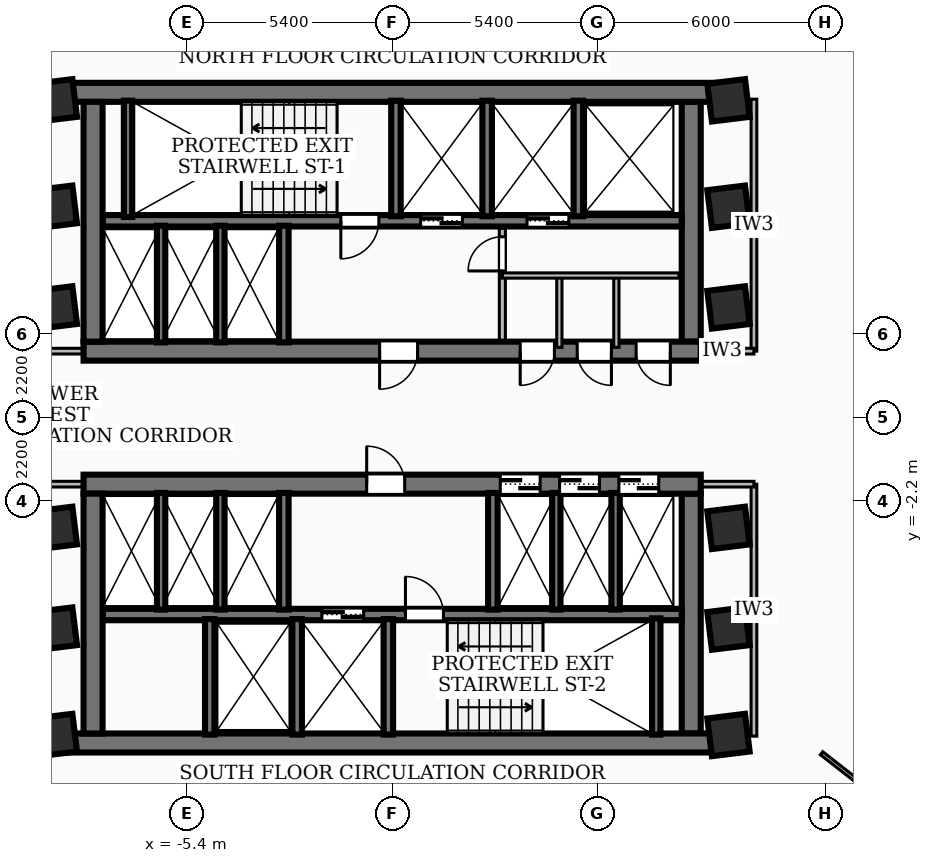
"""IFC4 building model, lengths in metres.
Left out: names, types, materials, properties, quantities, classifications, styles, units other than length and angle.
Written with IfcOpenShell. Run it as: python <this file> out.ifc"""

import sys

from ifc_helpers import new_model, si_unit, direction, frame, frame_2d, origin, origin_2d, place, context, subcontext, project, spatial, rectangle, extrude, element, fill, save


model = new_model("IFC4")
c1 = context("Model", 3, precision=1e-05, world=origin(), true_north=direction((0.0, 1.0)))
c2 = subcontext(c1, "Body", "Model", "MODEL_VIEW")
j1 = project(units=[si_unit("LENGTHUNIT", "METRE"), si_unit("PLANEANGLEUNIT", "RADIAN")], contexts=[c1])
p1 = place(None, origin())
s1 = spatial("IfcSite", under=j1, at=p1, CompositionType="ELEMENT")
p2 = place(p1, origin())
s2 = spatial("IfcBuilding", under=s1, at=p2, CompositionType="ELEMENT")
p3 = place(p2, frame((0.0, 0.0, 82.08)))
s3 = spatial("IfcBuildingStorey", under=s2, at=p3, CompositionType="ELEMENT", Elevation=82.08)
p4 = place(p3, frame((-8.78, 8.56, 0.0), z_axis=(0.0, 0.0, 1.0), x_axis=(1.0, 0.0, 0.0)))
e1 = element("IfcWall", 1, at=p4, inside=s3, PredefinedType="SHEAR", context=c2, shape_type="SweptSolid", body=[
    extrude(rectangle(XDim=17.56, YDim=0.5, at=frame_2d((8.78, 0.0))), origin(), (0.0, 0.0, 1.0), 3.34),
])
p5 = place(p3, frame((8.12, 1.75, 0.0), z_axis=(0.0, 0.0, 1.0), x_axis=(-1.0, 0.0, 0.0)))
e2 = element("IfcWall", 2, at=p5, inside=s3, PredefinedType="SHEAR", context=c2, shape_type="SweptSolid", body=[
    extrude(rectangle(XDim=16.24, YDim=0.5, at=frame_2d((8.12, 0.0))), origin(), (0.0, 0.0, 1.0), 3.34),
])
p6 = place(p5, frame((7.45, 0.0, 0.0)))
e3 = element("IfcOpeningElement", 3, at=p6, cuts=e2, PredefinedType="OPENING", context=c2, shape_type="SweptSolid", body=[
    extrude(rectangle(XDim=1.0, YDim=2.1, at=frame_2d((0.5, 1.05))), frame((0.0, 0.26, 0.0), z_axis=(0.0, -1.0, 0.0), x_axis=(1.0, 0.0, 0.0)), (0.0, 0.0, 1.0), 0.52),
])
p7 = place(p5, frame((3.85, 0.0, 0.0)))
e4 = element("IfcOpeningElement", 4, at=p7, cuts=e2, PredefinedType="OPENING", context=c2, shape_type="SweptSolid", body=[
    extrude(rectangle(XDim=0.9, YDim=2.06, at=frame_2d((0.45, 1.03))), frame((0.0, 0.26, 0.0), z_axis=(0.0, -1.0, 0.0), x_axis=(1.0, 0.0, 0.0)), (0.0, 0.0, 1.0), 0.52),
])
p8 = place(p5, frame((2.35, 0.0, 0.0)))
e5 = element("IfcOpeningElement", 5, at=p8, cuts=e2, PredefinedType="OPENING", context=c2, shape_type="SweptSolid", body=[
    extrude(rectangle(XDim=0.9, YDim=2.06, at=frame_2d((0.45, 1.03))), frame((0.0, 0.26, 0.0), z_axis=(0.0, -1.0, 0.0), x_axis=(1.0, 0.0, 0.0)), (0.0, 0.0, 1.0), 0.52),
])
p9 = place(p5, frame((0.8, 0.0, 0.0)))
e6 = element("IfcOpeningElement", 6, at=p9, cuts=e2, PredefinedType="OPENING", context=c2, shape_type="SweptSolid", body=[
    extrude(rectangle(XDim=0.9, YDim=2.06, at=frame_2d((0.45, 1.03))), frame((0.0, 0.26, 0.0), z_axis=(0.0, -1.0, 0.0), x_axis=(1.0, 0.0, 0.0)), (0.0, 0.0, 1.0), 0.52),
])
for number, where, z_axis, x_axis in (
    (7, (-7.87, 2.0, 0.0), (0.0, 0.0, 1.0), (0.0, 1.0, 0.0)),
    (8, (7.87, 8.31, 0.0), (0.0, 0.0, 1.0), (0.0, -1.0, 0.0)),
):
    element("IfcWall", number, at=place(p3, frame(where, z_axis=z_axis, x_axis=x_axis)), inside=s3, PredefinedType="SHEAR", context=c2, shape_type="SweptSolid", body=[
        extrude(rectangle(XDim=6.31, YDim=0.5, at=frame_2d((3.155, 0.0))), origin(), (0.0, 0.0, 1.0), 3.34),
    ])
p10 = place(p3, frame((7.62, 5.18, 0.0), z_axis=(0.0, 0.0, 1.0), x_axis=(-1.0, 0.0, 0.0)))
e9 = element("IfcWall", 9, at=p10, inside=s3, PredefinedType="SOLIDWALL", context=c2, shape_type="SweptSolid", body=[
    extrude(rectangle(XDim=15.24, YDim=0.3, at=frame_2d((7.62, 0.0))), origin(), (0.0, 0.0, 1.0), 3.34),
])
p11 = place(p10, frame((5.77, 0.0, 0.0)))
e10 = element("IfcOpeningElement", 10, at=p11, cuts=e9, PredefinedType="OPENING", context=c2, shape_type="SweptSolid", body=[
    extrude(rectangle(XDim=1.1, YDim=2.15, at=frame_2d((0.55, 1.075))), frame((0.0, 0.16, 0.0), z_axis=(0.0, -1.0, 0.0), x_axis=(1.0, 0.0, 0.0)), (0.0, 0.0, 1.0), 0.32),
])
p12 = place(p10, frame((2.97, 0.0, 0.0)))
e11 = element("IfcOpeningElement", 11, at=p12, cuts=e9, PredefinedType="OPENING", context=c2, shape_type="SweptSolid", body=[
    extrude(rectangle(XDim=1.1, YDim=2.15, at=frame_2d((0.55, 1.075))), frame((0.0, 0.16, 0.0), z_axis=(0.0, -1.0, 0.0), x_axis=(1.0, 0.0, 0.0)), (0.0, 0.0, 1.0), 0.32),
])
p13 = place(p10, frame((7.97, 0.0, 0.0)))
e12 = element("IfcOpeningElement", 12, at=p13, cuts=e9, PredefinedType="OPENING", context=c2, shape_type="SweptSolid", body=[
    extrude(rectangle(XDim=1.0, YDim=2.1, at=frame_2d((0.5, 1.05))), frame((0.0, 0.16, 0.0), z_axis=(0.0, -1.0, 0.0), x_axis=(1.0, 0.0, 0.0)), (0.0, 0.0, 1.0), 0.32),
])
p14 = place(p3, frame((8.78, -8.56, 0.0), z_axis=(0.0, 0.0, 1.0), x_axis=(-1.0, 0.0, 0.0)))
e13 = element("IfcWall", 13, at=p14, inside=s3, PredefinedType="SHEAR", context=c2, shape_type="SweptSolid", body=[
    extrude(rectangle(XDim=17.56, YDim=0.5, at=frame_2d((8.78, 0.0))), origin(), (0.0, 0.0, 1.0), 3.34),
])
p15 = place(p3, frame((-8.12, -1.75, 0.0), z_axis=(0.0, 0.0, 1.0), x_axis=(1.0, 0.0, 0.0)))
e14 = element("IfcWall", 14, at=p15, inside=s3, PredefinedType="SHEAR", context=c2, shape_type="SweptSolid", body=[
    extrude(rectangle(XDim=16.24, YDim=0.5, at=frame_2d((8.12, 0.0))), origin(), (0.0, 0.0, 1.0), 3.34),
])
p16 = place(p15, frame((7.45, 0.0, 0.0)))
e15 = element("IfcOpeningElement", 15, at=p16, cuts=e14, PredefinedType="OPENING", context=c2, shape_type="SweptSolid", body=[
    extrude(rectangle(XDim=1.0, YDim=2.1, at=frame_2d((0.5, 1.05))), frame((0.0, 0.26, 0.0), z_axis=(0.0, -1.0, 0.0), x_axis=(1.0, 0.0, 0.0)), (0.0, 0.0, 1.0), 0.52),
])
p17 = place(p15, frame((10.965, 0.0, 0.0)))
e16 = element("IfcOpeningElement", 16, at=p17, cuts=e14, PredefinedType="OPENING", context=c2, shape_type="SweptSolid", body=[
    extrude(rectangle(XDim=1.05, YDim=2.15, at=frame_2d((0.525, 1.075))), frame((0.0, 0.26, 0.0), z_axis=(0.0, -1.0, 0.0), x_axis=(1.0, 0.0, 0.0)), (0.0, 0.0, 1.0), 0.52),
])
p18 = place(p15, frame((12.525, 0.0, 0.0)))
e17 = element("IfcOpeningElement", 17, at=p18, cuts=e14, PredefinedType="OPENING", context=c2, shape_type="SweptSolid", body=[
    extrude(rectangle(XDim=1.05, YDim=2.15, at=frame_2d((0.525, 1.075))), frame((0.0, 0.26, 0.0), z_axis=(0.0, -1.0, 0.0), x_axis=(1.0, 0.0, 0.0)), (0.0, 0.0, 1.0), 0.52),
])
p19 = place(p15, frame((14.085, 0.0, 0.0)))
e18 = element("IfcOpeningElement", 18, at=p19, cuts=e14, PredefinedType="OPENING", context=c2, shape_type="SweptSolid", body=[
    extrude(rectangle(XDim=1.05, YDim=2.15, at=frame_2d((0.525, 1.075))), frame((0.0, 0.26, 0.0), z_axis=(0.0, -1.0, 0.0), x_axis=(1.0, 0.0, 0.0)), (0.0, 0.0, 1.0), 0.52),
])
for number, where, z_axis, x_axis in (
    (19, (-7.87, -8.31, 0.0), (0.0, 0.0, 1.0), (0.0, 1.0, 0.0)),
    (20, (7.87, -2.0, 0.0), (0.0, 0.0, 1.0), (0.0, -1.0, 0.0)),
):
    element("IfcWall", number, at=place(p3, frame(where, z_axis=z_axis, x_axis=x_axis)), inside=s3, PredefinedType="SHEAR", context=c2, shape_type="SweptSolid", body=[
        extrude(rectangle(XDim=6.31, YDim=0.5, at=frame_2d((3.155, 0.0))), origin(), (0.0, 0.0, 1.0), 3.34),
    ])
p20 = place(p3, frame((-7.62, -5.18, 0.0), z_axis=(0.0, 0.0, 1.0), x_axis=(1.0, 0.0, 0.0)))
e21 = element("IfcWall", 21, at=p20, inside=s3, PredefinedType="SOLIDWALL", context=c2, shape_type="SweptSolid", body=[
    extrude(rectangle(XDim=15.24, YDim=0.3, at=frame_2d((7.62, 0.0))), origin(), (0.0, 0.0, 1.0), 3.34),
])
p21 = place(p20, frame((5.77, 0.0, 0.0)))
e22 = element("IfcOpeningElement", 22, at=p21, cuts=e21, PredefinedType="OPENING", context=c2, shape_type="SweptSolid", body=[
    extrude(rectangle(XDim=1.1, YDim=2.15, at=frame_2d((0.55, 1.075))), frame((0.0, 0.16, 0.0), z_axis=(0.0, -1.0, 0.0), x_axis=(1.0, 0.0, 0.0)), (0.0, 0.0, 1.0), 0.32),
])
p22 = place(p20, frame((7.97, 0.0, 0.0)))
e23 = element("IfcOpeningElement", 23, at=p22, cuts=e21, PredefinedType="OPENING", context=c2, shape_type="SweptSolid", body=[
    extrude(rectangle(XDim=1.0, YDim=2.1, at=frame_2d((0.5, 1.05))), frame((0.0, 0.16, 0.0), z_axis=(0.0, -1.0, 0.0), x_axis=(1.0, 0.0, 0.0)), (0.0, 0.0, 1.0), 0.32),
])
for number, where, z_axis, x_axis in (
    (24, (-6.95, 5.28, 0.0), (0.0, 0.0, 1.0), (0.0, 1.0, 0.0)),
    (25, (6.95, -8.34, 0.0), (0.0, 0.0, 1.0), (0.0, 1.0, 0.0)),
):
    element("IfcWall", number, at=place(p3, frame(where, z_axis=z_axis, x_axis=x_axis)), inside=s3, PredefinedType="SOLIDWALL", context=c2, shape_type="SweptSolid", body=[
        extrude(rectangle(XDim=3.06, YDim=0.22, at=frame_2d((1.53, 0.0))), origin(), (0.0, 0.0, 1.0), 3.34),
    ])
for number, where, z_axis, x_axis in (
    (26, (0.1, 5.3, 0.0), (0.0, 0.0, 1.0), (0.0, 1.0, 0.0)),
    (27, (2.5, 5.3, 0.0), (0.0, 0.0, 1.0), (0.0, 1.0, 0.0)),
    (28, (4.9, 5.3, 0.0), (0.0, 0.0, 1.0), (0.0, 1.0, 0.0)),
):
    element("IfcWall", number, at=place(p3, frame(where, z_axis=z_axis, x_axis=x_axis)), inside=s3, PredefinedType="SOLIDWALL", context=c2, shape_type="SweptSolid", body=[
        extrude(rectangle(XDim=3.04, YDim=0.25, at=frame_2d((1.52, 0.0))), origin(), (0.0, 0.0, 1.0), 3.34),
    ])
p23 = place(p3, frame((-2.85, 1.98, 0.0), z_axis=(0.0, 0.0, 1.0), x_axis=(0.0, 1.0, 0.0)))
e29 = element("IfcWall", 29, at=p23, inside=s3, PredefinedType="SOLIDWALL", context=c2, shape_type="SweptSolid", body=[
    extrude(rectangle(XDim=3.07, YDim=0.25, at=frame_2d((1.535, 0.0))), origin(), (0.0, 0.0, 1.0), 3.34),
])
for number, where, z_axis, x_axis in (
    (30, (-0.1, -8.34, 0.0), (0.0, 0.0, 1.0), (0.0, 1.0, 0.0)),
    (31, (-2.5, -8.34, 0.0), (0.0, 0.0, 1.0), (0.0, 1.0, 0.0)),
    (32, (-4.8, -8.34, 0.0), (0.0, 0.0, 1.0), (0.0, 1.0, 0.0)),
):
    element("IfcWall", number, at=place(p3, frame(where, z_axis=z_axis, x_axis=x_axis)), inside=s3, PredefinedType="SOLIDWALL", context=c2, shape_type="SweptSolid", body=[
        extrude(rectangle(XDim=3.04, YDim=0.25, at=frame_2d((1.52, 0.0))), origin(), (0.0, 0.0, 1.0), 3.34),
    ])
for number, where, z_axis, x_axis in (
    (33, (-2.85, -5.05, 0.0), (0.0, 0.0, 1.0), (0.0, 1.0, 0.0)),
    (34, (2.65, -5.05, 0.0), (0.0, 0.0, 1.0), (0.0, 1.0, 0.0)),
):
    element("IfcWall", number, at=place(p3, frame(where, z_axis=z_axis, x_axis=x_axis)), inside=s3, PredefinedType="SOLIDWALL", context=c2, shape_type="SweptSolid", body=[
        extrude(rectangle(XDim=3.07, YDim=0.25, at=frame_2d((1.535, 0.0))), origin(), (0.0, 0.0, 1.0), 3.34),
    ])
for number, where, z_axis, x_axis in (
    (35, (-6.08, 1.98, 0.0), (0.0, 0.0, 1.0), (0.0, 1.0, 0.0)),
    (36, (-4.52, 1.98, 0.0), (0.0, 0.0, 1.0), (0.0, 1.0, 0.0)),
    (37, (4.32, -5.05, 0.0), (0.0, 0.0, 1.0), (0.0, 1.0, 0.0)),
    (38, (5.88, -5.05, 0.0), (0.0, 0.0, 1.0), (0.0, 1.0, 0.0)),
    (39, (-6.08, -5.05, 0.0), (0.0, 0.0, 1.0), (0.0, 1.0, 0.0)),
    (40, (-4.52, -5.05, 0.0), (0.0, 0.0, 1.0), (0.0, 1.0, 0.0)),
):
    element("IfcWall", number, at=place(p3, frame(where, z_axis=z_axis, x_axis=x_axis)), inside=s3, PredefinedType="SOLIDWALL", context=c2, shape_type="SweptSolid", body=[
        extrude(rectangle(XDim=3.07, YDim=0.22, at=frame_2d((1.535, 0.0))), origin(), (0.0, 0.0, 1.0), 3.34),
    ])
for number, where, z_axis, x_axis in (
    (41, (-8.85, -5.55, 0.0), (0.0, 0.0, 1.0), (0.993, 0.122, 0.0)),
    (42, (-8.85, -2.9, 0.0), (0.0, 0.0, 1.0), (0.993, 0.122, 0.0)),
    (43, (-8.85, 2.9, 0.0), (0.0, 0.0, 1.0), (0.993, 0.122, 0.0)),
    (44, (-8.85, 5.55, 0.0), (0.0, 0.0, 1.0), (0.993, 0.122, 0.0)),
    (45, (8.85, -5.55, 0.0), (0.0, 0.0, 1.0), (0.993, 0.122, 0.0)),
    (46, (8.85, -2.9, 0.0), (0.0, 0.0, 1.0), (0.993, 0.122, 0.0)),
    (47, (8.85, 2.9, 0.0), (0.0, 0.0, 1.0), (0.993, 0.122, 0.0)),
    (48, (8.85, 5.55, 0.0), (0.0, 0.0, 1.0), (0.993, 0.122, 0.0)),
    (49, (-8.85, 8.35, 0.0), (0.0, 0.0, 1.0), (0.993, 0.122, 0.0)),
    (50, (8.85, -8.35, 0.0), (0.0, 0.0, 1.0), (0.993, 0.122, 0.0)),
    (51, (8.85, 8.35, 0.0), (0.0, 0.0, 1.0), (0.993, 0.122, 0.0)),
    (52, (-8.85, -8.35, 0.0), (0.0, 0.0, 1.0), (0.993, 0.122, 0.0)),
):
    element("IfcColumn", number, at=place(p3, frame(where, z_axis=z_axis, x_axis=x_axis)), inside=s3, PredefinedType="COLUMN", context=c2, shape_type="SweptSolid", body=[
        extrude(rectangle(XDim=1.0, YDim=1.0, at=origin_2d()), origin(), (0.0, 0.0, 1.0), 3.6),
    ])
p24 = place(p3, frame((2.9, 2.04, 0.0), z_axis=(0.0, 0.0, 1.0), x_axis=(0.0, 1.0, 0.0)))
e53 = element("IfcWall", 53, at=p24, inside=s3, PredefinedType="PARTITIONING", context=c2, shape_type="SweptSolid", body=[
    extrude(rectangle(XDim=2.94, YDim=0.16, at=frame_2d((1.47, 0.0))), origin(), (0.0, 0.0, 1.0), 2.405),
])
p25 = place(p24, frame((1.82, 0.0, 0.0)))
e54 = element("IfcOpeningElement", 54, at=p25, cuts=e53, PredefinedType="OPENING", context=c2, shape_type="SweptSolid", body=[
    extrude(rectangle(XDim=0.9, YDim=2.06, at=frame_2d((0.45, 1.03))), frame((0.0, 0.09, 0.0), z_axis=(0.0, -1.0, 0.0), x_axis=(1.0, 0.0, 0.0)), (0.0, 0.0, 1.0), 0.18),
])
p26 = place(p3, frame((2.9, 3.74, 0.0), z_axis=(0.0, 0.0, 1.0), x_axis=(1.0, 0.0, 0.0)))
e55 = element("IfcWall", 55, at=p26, inside=s3, PredefinedType="PARTITIONING", context=c2, shape_type="SweptSolid", body=[
    extrude(rectangle(XDim=4.65, YDim=0.138, at=frame_2d((2.325, 0.0))), origin(), (0.0, 0.0, 1.0), 3.34),
])
for number, where, z_axis, x_axis in (
    (56, (4.4, 1.85, 0.0), (0.0, 0.0, 1.0), (0.0, 1.0, 0.0)),
    (57, (5.9, 1.85, 0.0), (0.0, 0.0, 1.0), (0.0, 1.0, 0.0)),
):
    element("IfcWall", number, at=place(p3, frame(where, z_axis=z_axis, x_axis=x_axis)), inside=s3, PredefinedType="PARTITIONING", context=c2, shape_type="SweptSolid", body=[
        extrude(rectangle(XDim=1.89, YDim=0.138, at=frame_2d((0.945, 0.0))), origin(), (0.0, 0.0, 1.0), 2.405),
    ])
for number, where, z_axis, x_axis in (
    (58, (-7.85, 1.75, 0.0), (0.0, 0.0, 1.0), (-1.0, 0.0, 0.0)),
    (59, (-7.85, -1.75, 0.0), (0.0, 0.0, 1.0), (-1.0, 0.0, 0.0)),
):
    element("IfcWall", number, at=place(p3, frame(where, z_axis=z_axis, x_axis=x_axis)), inside=s3, PredefinedType="PARTITIONING", context=c2, shape_type="SweptSolid", body=[
        extrude(rectangle(XDim=1.67, YDim=0.15, at=frame_2d((0.835, 0.0))), origin(), (0.0, 0.0, 1.0), 2.405),
    ])
p27 = place(p3, frame((9.52, 1.75, 0.0), z_axis=(0.0, 0.0, 1.0), x_axis=(0.0, 1.0, 0.0)))
e60 = element("IfcWall", 60, at=p27, inside=s3, PredefinedType="PARTITIONING", context=c2, shape_type="SweptSolid", body=[
    extrude(rectangle(XDim=6.63, YDim=0.15, at=frame_2d((3.315, 0.0))), origin(), (0.0, 0.0, 1.0), 2.486),
])
p28 = place(p3, frame((7.85, 1.75, 0.0), z_axis=(0.0, 0.0, 1.0), x_axis=(1.0, 0.0, 0.0)))
e61 = element("IfcWall", 61, at=p28, inside=s3, PredefinedType="PARTITIONING", context=c2, shape_type="SweptSolid", body=[
    extrude(rectangle(XDim=1.67, YDim=0.15, at=frame_2d((0.835, 0.0))), origin(), (0.0, 0.0, 1.0), 2.405),
])
p29 = place(p3, frame((9.52, -8.38, 0.0), z_axis=(0.0, 0.0, 1.0), x_axis=(0.0, 1.0, 0.0)))
e62 = element("IfcWall", 62, at=p29, inside=s3, PredefinedType="PARTITIONING", context=c2, shape_type="SweptSolid", body=[
    extrude(rectangle(XDim=6.63, YDim=0.15, at=frame_2d((3.315, 0.0))), origin(), (0.0, 0.0, 1.0), 2.486),
])
p30 = place(p3, frame((7.85, -1.75, 0.0), z_axis=(0.0, 0.0, 1.0), x_axis=(1.0, 0.0, 0.0)))
e63 = element("IfcWall", 63, at=p30, inside=s3, PredefinedType="PARTITIONING", context=c2, shape_type="SweptSolid", body=[
    extrude(rectangle(XDim=1.67, YDim=0.15, at=frame_2d((0.835, 0.0))), origin(), (0.0, 0.0, 1.0), 2.405),
])
p31 = place(p3, frame((11.3, -8.829, 0.0), z_axis=(0.0, 0.0, 1.0), x_axis=(0.788014623364, -0.61565652223, 0.0)))
e64 = element("IfcWall", 64, at=p31, inside=s3, PredefinedType="PARTITIONING", context=c2, shape_type="SweptSolid", body=[
    extrude(rectangle(XDim=5.315, YDim=0.1, at=frame_2d((2.657, 0.0))), origin(), (0.0, 0.0, 1.0), 3.34),
])
p32 = place(p6, origin())
e65 = element("IfcDoor", 65, at=p32, inside=s3, OperationType="SINGLE_SWING_RIGHT", PredefinedType="DOOR", context=c2, shape_type="SweptSolid", body=[
    extrude(rectangle(XDim=1.0, YDim=2.1, at=frame_2d((0.5, 1.05))), frame((0.0, 0.025, 0.0), z_axis=(0.0, -1.0, 0.0), x_axis=(1.0, 0.0, 0.0)), (0.0, 0.0, 1.0), 0.05),
])
fill(e3, e65)
p33 = place(p16, origin())
e66 = element("IfcDoor", 66, at=p33, inside=s3, OperationType="SINGLE_SWING_LEFT", PredefinedType="DOOR", context=c2, shape_type="SweptSolid", body=[
    extrude(rectangle(XDim=1.0, YDim=2.1, at=frame_2d((0.5, 1.05))), frame((0.0, 0.025, 0.0), z_axis=(0.0, -1.0, 0.0), x_axis=(1.0, 0.0, 0.0)), (0.0, 0.0, 1.0), 0.05),
])
fill(e15, e66)
p34 = place(p11, origin())
e67 = element("IfcDoor", 67, at=p34, inside=s3, OperationType="DOUBLE_DOOR_SLIDING", PredefinedType="DOOR", context=c2, shape_type="SweptSolid", body=[
    extrude(rectangle(XDim=1.1, YDim=2.15, at=frame_2d((0.55, 1.075))), frame((0.0, 0.025, 0.0), z_axis=(0.0, -1.0, 0.0), x_axis=(1.0, 0.0, 0.0)), (0.0, 0.0, 1.0), 0.05),
])
fill(e10, e67)
p35 = place(p12, origin())
e68 = element("IfcDoor", 68, at=p35, inside=s3, OperationType="DOUBLE_DOOR_SLIDING", PredefinedType="DOOR", context=c2, shape_type="SweptSolid", body=[
    extrude(rectangle(XDim=1.1, YDim=2.15, at=frame_2d((0.55, 1.075))), frame((0.0, 0.025, 0.0), z_axis=(0.0, -1.0, 0.0), x_axis=(1.0, 0.0, 0.0)), (0.0, 0.0, 1.0), 0.05),
])
fill(e11, e68)
p36 = place(p13, origin())
e69 = element("IfcDoor", 69, at=p36, inside=s3, OperationType="SINGLE_SWING_RIGHT", PredefinedType="DOOR", context=c2, shape_type="SweptSolid", body=[
    extrude(rectangle(XDim=1.0, YDim=2.1, at=frame_2d((0.5, 1.05))), frame((0.0, 0.025, 0.0), z_axis=(0.0, -1.0, 0.0), x_axis=(1.0, 0.0, 0.0)), (0.0, 0.0, 1.0), 0.05),
])
fill(e12, e69)
p37 = place(p21, origin())
e70 = element("IfcDoor", 70, at=p37, inside=s3, OperationType="DOUBLE_DOOR_SLIDING", PredefinedType="DOOR", context=c2, shape_type="SweptSolid", body=[
    extrude(rectangle(XDim=1.1, YDim=2.15, at=frame_2d((0.55, 1.075))), frame((0.0, 0.025, 0.0), z_axis=(0.0, -1.0, 0.0), x_axis=(1.0, 0.0, 0.0)), (0.0, 0.0, 1.0), 0.05),
])
fill(e22, e70)
p38 = place(p22, origin())
e71 = element("IfcDoor", 71, at=p38, inside=s3, OperationType="SINGLE_SWING_LEFT", PredefinedType="DOOR", context=c2, shape_type="SweptSolid", body=[
    extrude(rectangle(XDim=1.0, YDim=2.1, at=frame_2d((0.5, 1.05))), frame((0.0, 0.025, 0.0), z_axis=(0.0, -1.0, 0.0), x_axis=(1.0, 0.0, 0.0)), (0.0, 0.0, 1.0), 0.05),
])
fill(e23, e71)
p39 = place(p17, origin())
e72 = element("IfcDoor", 72, at=p39, inside=s3, OperationType="DOUBLE_DOOR_SLIDING", PredefinedType="DOOR", context=c2, shape_type="SweptSolid", body=[
    extrude(rectangle(XDim=1.05, YDim=2.15, at=frame_2d((0.525, 1.075))), frame((0.0, 0.025, 0.0), z_axis=(0.0, -1.0, 0.0), x_axis=(1.0, 0.0, 0.0)), (0.0, 0.0, 1.0), 0.05),
])
fill(e16, e72)
p40 = place(p18, origin())
e73 = element("IfcDoor", 73, at=p40, inside=s3, OperationType="DOUBLE_DOOR_SLIDING", PredefinedType="DOOR", context=c2, shape_type="SweptSolid", body=[
    extrude(rectangle(XDim=1.05, YDim=2.15, at=frame_2d((0.525, 1.075))), frame((0.0, 0.025, 0.0), z_axis=(0.0, -1.0, 0.0), x_axis=(1.0, 0.0, 0.0)), (0.0, 0.0, 1.0), 0.05),
])
fill(e17, e73)
p41 = place(p19, origin())
e74 = element("IfcDoor", 74, at=p41, inside=s3, OperationType="DOUBLE_DOOR_SLIDING", PredefinedType="DOOR", context=c2, shape_type="SweptSolid", body=[
    extrude(rectangle(XDim=1.05, YDim=2.15, at=frame_2d((0.525, 1.075))), frame((0.0, 0.025, 0.0), z_axis=(0.0, -1.0, 0.0), x_axis=(1.0, 0.0, 0.0)), (0.0, 0.0, 1.0), 0.05),
])
fill(e18, e74)
p42 = place(p7, origin())
e75 = element("IfcDoor", 75, at=p42, inside=s3, OperationType="SINGLE_SWING_RIGHT", PredefinedType="DOOR", context=c2, shape_type="SweptSolid", body=[
    extrude(rectangle(XDim=0.9, YDim=2.06, at=frame_2d((0.45, 1.03))), frame((0.0, 0.025, 0.0), z_axis=(0.0, -1.0, 0.0), x_axis=(1.0, 0.0, 0.0)), (0.0, 0.0, 1.0), 0.05),
])
fill(e4, e75)
p43 = place(p8, origin())
e76 = element("IfcDoor", 76, at=p43, inside=s3, OperationType="SINGLE_SWING_LEFT", PredefinedType="DOOR", context=c2, shape_type="SweptSolid", body=[
    extrude(rectangle(XDim=0.9, YDim=2.06, at=frame_2d((0.45, 1.03))), frame((0.0, 0.025, 0.0), z_axis=(0.0, -1.0, 0.0), x_axis=(1.0, 0.0, 0.0)), (0.0, 0.0, 1.0), 0.05),
])
fill(e5, e76)
p44 = place(p9, origin())
e77 = element("IfcDoor", 77, at=p44, inside=s3, OperationType="SINGLE_SWING_LEFT", PredefinedType="DOOR", context=c2, shape_type="SweptSolid", body=[
    extrude(rectangle(XDim=0.9, YDim=2.06, at=frame_2d((0.45, 1.03))), frame((0.0, 0.025, 0.0), z_axis=(0.0, -1.0, 0.0), x_axis=(1.0, 0.0, 0.0)), (0.0, 0.0, 1.0), 0.05),
])
fill(e6, e77)
p45 = place(p25, origin())
e78 = element("IfcDoor", 78, at=p45, inside=s3, OperationType="SINGLE_SWING_LEFT", PredefinedType="DOOR", context=c2, shape_type="SweptSolid", body=[
    extrude(rectangle(XDim=0.9, YDim=2.06, at=frame_2d((0.45, 1.03))), frame((0.0, 0.025, 0.0), z_axis=(0.0, -1.0, 0.0), x_axis=(1.0, 0.0, 0.0)), (0.0, 0.0, 1.0), 0.05),
])
fill(e54, e78)
save(model, sys.argv[1])
